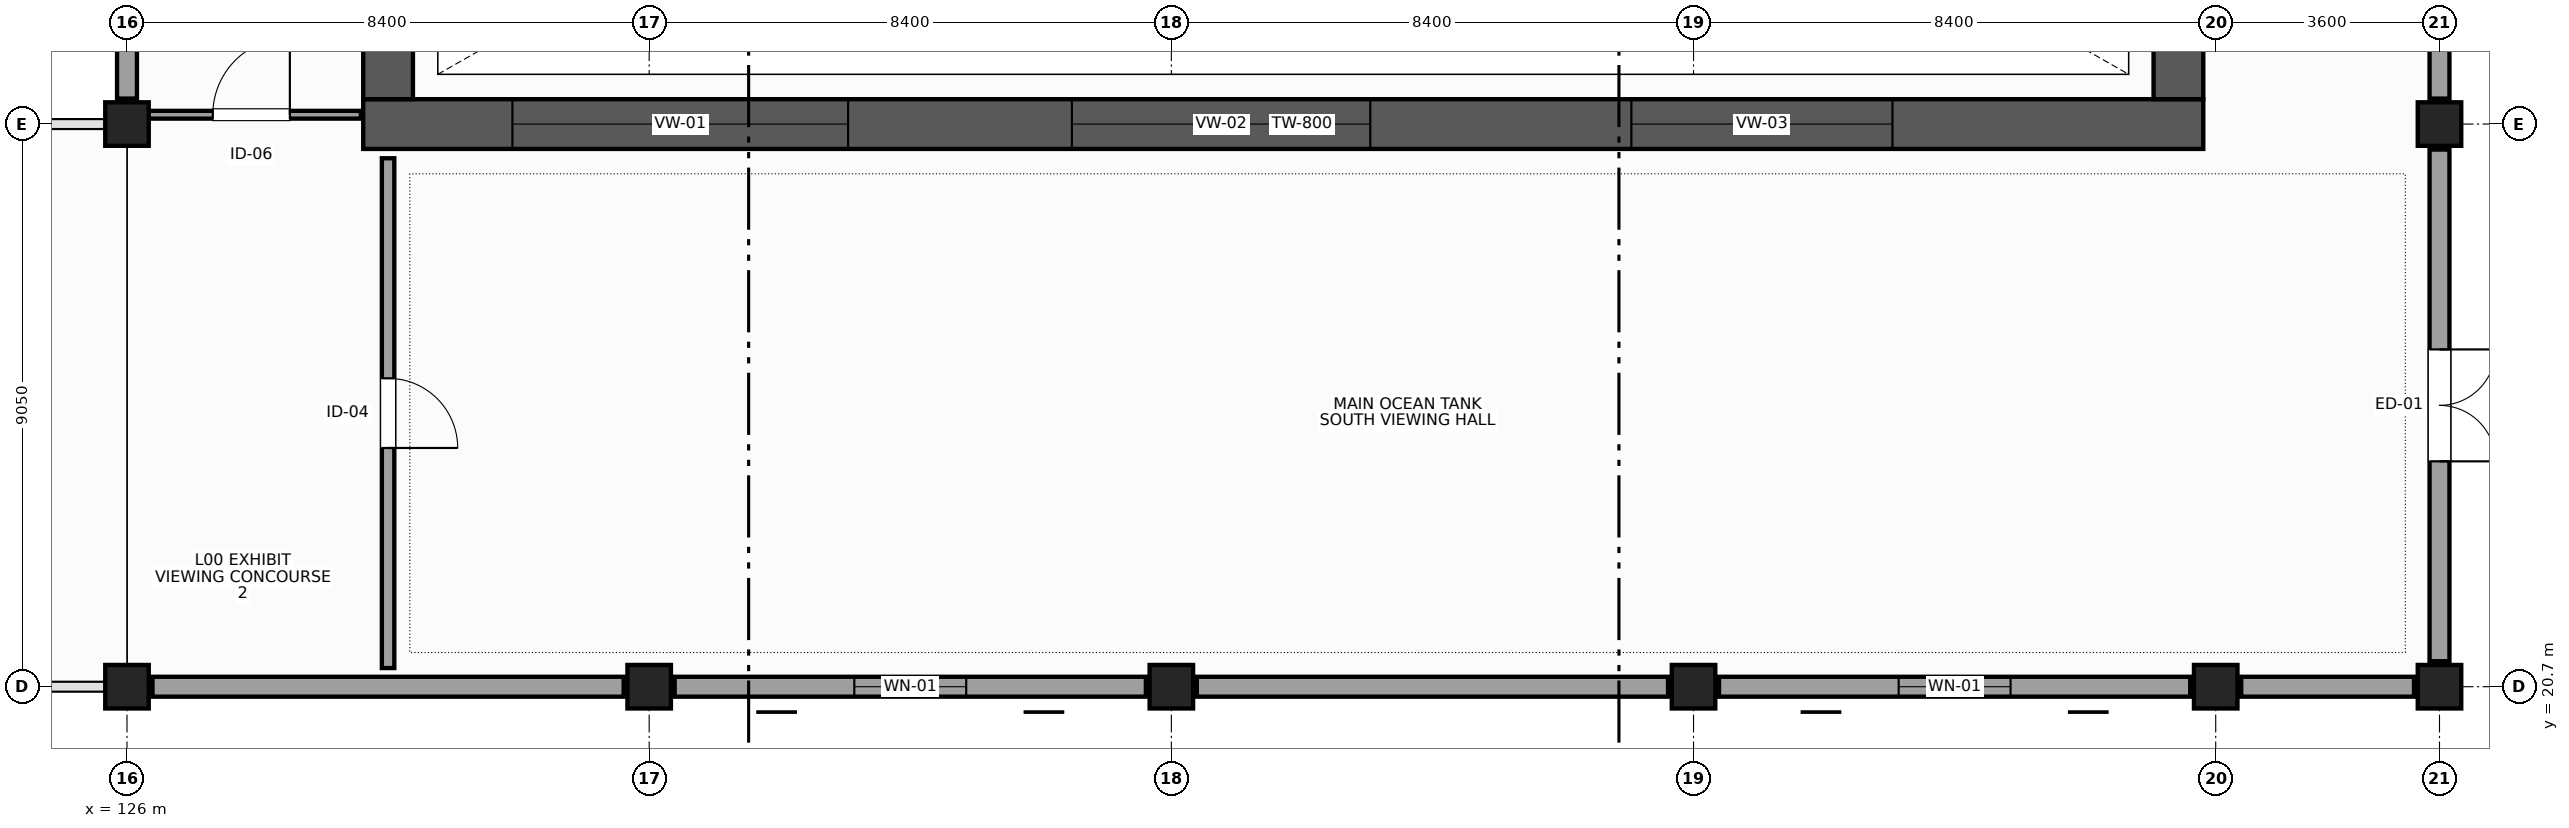
"""IFC4 building model, lengths in metres.
Left out: names, types, materials, properties, quantities, classifications, styles, units other than length and angle.
Written with IfcOpenShell. Run it as: python <this file> out.ifc"""

import sys

from ifc_helpers import new_model, si_unit, direction, frame, frame_2d, origin, origin_2d, place, context, subcontext, project, spatial, rectangle, extrude, element, fill, save


model = new_model("IFC4")
c1 = context("Model", 3, precision=1e-05, world=origin(), true_north=direction((0.0, 1.0)))
c2 = subcontext(c1, "Body", "Model", "MODEL_VIEW")
j1 = project(units=[si_unit("LENGTHUNIT", "METRE"), si_unit("PLANEANGLEUNIT", "RADIAN")], contexts=[c1])
p1 = place(None, origin())
s1 = spatial("IfcSite", under=j1, at=p1, CompositionType="ELEMENT")
p2 = place(p1, origin())
s2 = spatial("IfcBuilding", under=s1, at=p2, CompositionType="ELEMENT")
p3 = place(p2, origin())
s3 = spatial("IfcBuildingStorey", under=s2, at=p3, CompositionType="ELEMENT", Elevation=0.0)
for number, where, z_axis, x_axis in (
    (1, (126.0, 20.7, 0.0), (0.0, 0.0, 1.0), (1.0, 0.0, 0.0)),
    (2, (126.0, 29.75, 0.0), (0.0, 0.0, 1.0), (1.0, 0.0, 0.0)),
    (3, (134.4, 20.7, 0.0), (0.0, 0.0, 1.0), (1.0, 0.0, 0.0)),
    (4, (142.8, 20.7, 0.0), (0.0, 0.0, 1.0), (1.0, 0.0, 0.0)),
    (5, (151.2, 20.7, 0.0), (0.0, 0.0, 1.0), (1.0, 0.0, 0.0)),
    (6, (159.6, 20.7, 0.0), (0.0, 0.0, 1.0), (1.0, 0.0, 0.0)),
    (7, (163.2, 20.7, 0.0), (0.0, 0.0, 1.0), (1.0, 0.0, 0.0)),
    (8, (163.2, 29.75, 0.0), (0.0, 0.0, 1.0), (1.0, 0.0, 0.0)),
):
    element("IfcColumn", number, at=place(p3, frame(where, z_axis=z_axis, x_axis=x_axis)), inside=s3, PredefinedType="COLUMN", context=c2, shape_type="SweptSolid", body=[
        extrude(rectangle(XDim=0.7, YDim=0.7, at=origin_2d()), origin(), (0.0, 0.0, 1.0), 5.4),
    ])
p4 = place(p3, frame((129.8, 29.75, 0.0), z_axis=(0.0, 0.0, 1.0), x_axis=(1.0, 0.0, 0.0)))
e9 = element("IfcWall", 9, at=p4, inside=s3, PredefinedType="SOLIDWALL", context=c2, shape_type="SweptSolid", body=[
    extrude(rectangle(XDim=29.6, YDim=0.8, at=frame_2d((14.8, 0.0))), origin(), (0.0, 0.0, 1.0), 5.09),
])
p5 = place(p4, frame((2.4, 0.0, 0.7)))
e10 = element("IfcOpeningElement", 10, at=p5, cuts=e9, PredefinedType="OPENING", context=c2, shape_type="SweptSolid", body=[
    extrude(rectangle(XDim=5.4, YDim=3.6, at=frame_2d((2.7, 1.8))), frame((0.0, 0.41, 0.0), z_axis=(0.0, -1.0, 0.0), x_axis=(1.0, 0.0, 0.0)), (0.0, 0.0, 1.0), 0.82),
])
p6 = place(p4, frame((11.4, 0.0, 0.7)))
e11 = element("IfcOpeningElement", 11, at=p6, cuts=e9, PredefinedType="OPENING", context=c2, shape_type="SweptSolid", body=[
    extrude(rectangle(XDim=4.8, YDim=3.4, at=frame_2d((2.4, 1.7))), frame((0.0, 0.41, 0.0), z_axis=(0.0, -1.0, 0.0), x_axis=(1.0, 0.0, 0.0)), (0.0, 0.0, 1.0), 0.82),
])
p7 = place(p4, frame((20.4, 0.0, 0.7)))
e12 = element("IfcOpeningElement", 12, at=p7, cuts=e9, PredefinedType="OPENING", context=c2, shape_type="SweptSolid", body=[
    extrude(rectangle(XDim=4.2, YDim=3.2, at=frame_2d((2.1, 1.6))), frame((0.0, 0.41, 0.0), z_axis=(0.0, -1.0, 0.0), x_axis=(1.0, 0.0, 0.0)), (0.0, 0.0, 1.0), 0.82),
])
p8 = place(p3, frame((130.2, 30.15, 0.0), z_axis=(0.0, 0.0, 1.0), x_axis=(0.0, 1.0, 0.0)))
e13 = element("IfcWall", 13, at=p8, inside=s3, PredefinedType="SOLIDWALL", context=c2, shape_type="SweptSolid", body=[
    extrude(rectangle(XDim=15.9, YDim=0.8, at=frame_2d((7.95, 0.0))), origin(), (0.0, 0.0, 1.0), 5.09),
])
p9 = place(p8, frame((6.15, 0.0, 0.75)))
e14 = element("IfcOpeningElement", 14, at=p9, cuts=e13, PredefinedType="OPENING", context=c2, shape_type="SweptSolid", body=[
    extrude(rectangle(XDim=3.6, YDim=2.8, at=frame_2d((1.8, 1.4))), frame((0.0, 0.41, 0.0), z_axis=(0.0, -1.0, 0.0), x_axis=(1.0, 0.0, 0.0)), (0.0, 0.0, 1.0), 0.82),
])
p10 = place(p3, frame((159.0, 30.15, 0.0), z_axis=(0.0, 0.0, 1.0), x_axis=(0.0, 1.0, 0.0)))
e15 = element("IfcWall", 15, at=p10, inside=s3, PredefinedType="SOLIDWALL", context=c2, shape_type="SweptSolid", body=[
    extrude(rectangle(XDim=15.9, YDim=0.8, at=frame_2d((7.95, 0.0))), origin(), (0.0, 0.0, 1.0), 5.09),
])
p11 = place(p10, frame((6.15, 0.0, 0.75)))
e16 = element("IfcOpeningElement", 16, at=p11, cuts=e15, PredefinedType="OPENING", context=c2, shape_type="SweptSolid", body=[
    extrude(rectangle(XDim=3.6, YDim=2.8, at=frame_2d((1.8, 1.4))), frame((0.0, 0.41, 0.0), z_axis=(0.0, -1.0, 0.0), x_axis=(1.0, 0.0, 0.0)), (0.0, 0.0, 1.0), 0.82),
])
p12 = place(p3, frame((163.2, 21.11, 0.0), z_axis=(0.0, 0.0, 1.0), x_axis=(0.0, 1.0, 0.0)))
e17 = element("IfcWall", 17, at=p12, inside=s3, PredefinedType="STANDARD", context=c2, shape_type="SweptSolid", body=[
    extrude(rectangle(XDim=8.23, YDim=0.32, at=frame_2d((4.115, 0.0))), origin(), (0.0, 0.0, 1.0), 4.24),
])
p13 = place(p12, frame((3.215, 0.0, 0.0)))
e18 = element("IfcOpeningElement", 18, at=p13, cuts=e17, PredefinedType="OPENING", context=c2, shape_type="SweptSolid", body=[
    extrude(rectangle(XDim=1.8, YDim=2.4, at=frame_2d((0.9, 1.2))), frame((0.0, 0.17, 0.0), z_axis=(0.0, -1.0, 0.0), x_axis=(1.0, 0.0, 0.0)), (0.0, 0.0, 1.0), 0.34),
])
p14 = place(p3, frame((163.2, 30.16, 0.0), z_axis=(0.0, 0.0, 1.0), x_axis=(0.0, 1.0, 0.0)))
e19 = element("IfcWall", 19, at=p14, inside=s3, PredefinedType="STANDARD", context=c2, shape_type="SweptSolid", body=[
    extrude(rectangle(XDim=8.23, YDim=0.32, at=frame_2d((4.115, 0.0))), origin(), (0.0, 0.0, 1.0), 4.24),
])
p15 = place(p14, frame((3.215, 0.0, 1.05)))
e20 = element("IfcOpeningElement", 20, at=p15, cuts=e19, PredefinedType="OPENING", context=c2, shape_type="SweptSolid", body=[
    extrude(rectangle(XDim=1.8, YDim=2.4, at=frame_2d((0.9, 1.2))), frame((0.0, 0.17, 0.0), z_axis=(0.0, -1.0, 0.0), x_axis=(1.0, 0.0, 0.0)), (0.0, 0.0, 1.0), 0.34),
])
p16 = place(p3, frame((126.41, 20.7, 0.0), z_axis=(0.0, 0.0, 1.0), x_axis=(1.0, 0.0, 0.0)))
e21 = element("IfcWall", 21, at=p16, inside=s3, PredefinedType="STANDARD", context=c2, shape_type="SweptSolid", body=[
    extrude(rectangle(XDim=7.58, YDim=0.32, at=frame_2d((3.79, 0.0))), origin(), (0.0, 0.0, 1.0), 4.23),
])
p17 = place(p3, frame((134.81, 20.7, 0.0), z_axis=(0.0, 0.0, 1.0), x_axis=(1.0, 0.0, 0.0)))
e22 = element("IfcWall", 22, at=p17, inside=s3, PredefinedType="STANDARD", context=c2, shape_type="SweptSolid", body=[
    extrude(rectangle(XDim=7.58, YDim=0.32, at=frame_2d((3.79, 0.0))), origin(), (0.0, 0.0, 1.0), 4.23),
])
p18 = place(p17, frame((2.89, 0.0, 1.05)))
e23 = element("IfcOpeningElement", 23, at=p18, cuts=e22, PredefinedType="OPENING", context=c2, shape_type="SweptSolid", body=[
    extrude(rectangle(XDim=1.8, YDim=2.4, at=frame_2d((0.9, 1.2))), frame((0.0, 0.17, 0.0), z_axis=(0.0, -1.0, 0.0), x_axis=(1.0, 0.0, 0.0)), (0.0, 0.0, 1.0), 0.34),
])
p19 = place(p3, frame((143.21, 20.7, 0.0), z_axis=(0.0, 0.0, 1.0), x_axis=(1.0, 0.0, 0.0)))
e24 = element("IfcWall", 24, at=p19, inside=s3, PredefinedType="STANDARD", context=c2, shape_type="SweptSolid", body=[
    extrude(rectangle(XDim=7.58, YDim=0.32, at=frame_2d((3.79, 0.0))), origin(), (0.0, 0.0, 1.0), 4.23),
])
p20 = place(p3, frame((151.61, 20.7, 0.0), z_axis=(0.0, 0.0, 1.0), x_axis=(1.0, 0.0, 0.0)))
e25 = element("IfcWall", 25, at=p20, inside=s3, PredefinedType="STANDARD", context=c2, shape_type="SweptSolid", body=[
    extrude(rectangle(XDim=7.58, YDim=0.32, at=frame_2d((3.79, 0.0))), origin(), (0.0, 0.0, 1.0), 4.23),
])
p21 = place(p20, frame((2.89, 0.0, 1.05)))
e26 = element("IfcOpeningElement", 26, at=p21, cuts=e25, PredefinedType="OPENING", context=c2, shape_type="SweptSolid", body=[
    extrude(rectangle(XDim=1.8, YDim=2.4, at=frame_2d((0.9, 1.2))), frame((0.0, 0.17, 0.0), z_axis=(0.0, -1.0, 0.0), x_axis=(1.0, 0.0, 0.0)), (0.0, 0.0, 1.0), 0.34),
])
p22 = place(p3, frame((160.01, 20.7, 0.0), z_axis=(0.0, 0.0, 1.0), x_axis=(1.0, 0.0, 0.0)))
e27 = element("IfcWall", 27, at=p22, inside=s3, PredefinedType="STANDARD", context=c2, shape_type="SweptSolid", body=[
    extrude(rectangle(XDim=2.78, YDim=0.32, at=frame_2d((1.39, 0.0))), origin(), (0.0, 0.0, 1.0), 4.23),
])
p23 = place(p3, frame((126.0, 38.39, 0.0), z_axis=(0.0, 0.0, 1.0), x_axis=(0.0, -1.0, 0.0)))
e28 = element("IfcWall", 28, at=p23, inside=s3, PredefinedType="STANDARD", context=c2, shape_type="SweptSolid", body=[
    extrude(rectangle(XDim=8.23, YDim=0.32, at=frame_2d((4.115, 0.0))), origin(), (0.0, 0.0, 1.0), 4.24),
])
p24 = place(p3, frame((130.2, 21.0, 0.0), z_axis=(0.0, 0.0, 1.0), x_axis=(0.0, 1.0, 0.0)))
e29 = element("IfcWall", 29, at=p24, inside=s3, PredefinedType="PARTITIONING", context=c2, shape_type="SweptSolid", body=[
    extrude(rectangle(XDim=8.2, YDim=0.2, at=frame_2d((4.1, 0.0))), origin(), (0.0, 0.0, 1.0), 4.23),
])
p25 = place(p24, frame((3.54, 0.0, 0.0)))
e30 = element("IfcOpeningElement", 30, at=p25, cuts=e29, PredefinedType="OPENING", context=c2, shape_type="SweptSolid", body=[
    extrude(rectangle(XDim=1.12, YDim=2.2, at=frame_2d((0.56, 1.1))), frame((0.0, 0.11, 0.0), z_axis=(0.0, -1.0, 0.0), x_axis=(1.0, 0.0, 0.0)), (0.0, 0.0, 1.0), 0.22),
])
p26 = place(p3, frame((126.237, 29.9, 0.0), z_axis=(0.0, 0.0, 1.0), x_axis=(1.0, 0.0, 0.0)))
e31 = element("IfcWall", 31, at=p26, inside=s3, PredefinedType="PARTITIONING", context=c2, shape_type="SweptSolid", body=[
    extrude(rectangle(XDim=3.525, YDim=0.125, at=frame_2d((1.762, 0.0))), origin(), (0.0, 0.0, 1.0), 4.14),
])
p27 = place(p26, frame((1.143, 0.0, 0.0)))
e32 = element("IfcOpeningElement", 32, at=p27, cuts=e31, PredefinedType="OPENING", context=c2, shape_type="SweptSolid", body=[
    extrude(rectangle(XDim=1.24, YDim=2.25, at=frame_2d((0.62, 1.125))), frame((0.0, 0.073, 0.0), z_axis=(0.0, -1.0, 0.0), x_axis=(1.0, 0.0, 0.0)), (0.0, 0.0, 1.0), 0.145),
])
p28 = place(p13, frame((1.8, 0.0, 0.0), z_axis=(0.0, 0.0, 1.0), x_axis=(-1.0, 0.0, 0.0)))
e33 = element("IfcDoor", 33, at=p28, inside=s3, OperationType="DOUBLE_DOOR_SINGLE_SWING", PredefinedType="DOOR", context=c2, shape_type="SweptSolid", body=[
    extrude(rectangle(XDim=1.8, YDim=2.4, at=frame_2d((0.9, 1.2))), frame((0.0, 0.025, 0.0), z_axis=(0.0, -1.0, 0.0), x_axis=(1.0, 0.0, 0.0)), (0.0, 0.0, 1.0), 0.05),
])
fill(e18, e33)
p29 = place(p18, origin())
e34 = element("IfcWindow", 34, at=p29, inside=s3, PartitioningType="SINGLE_PANEL", PredefinedType="WINDOW", context=c2, shape_type="SweptSolid", body=[
    extrude(rectangle(XDim=1.8, YDim=2.4, at=frame_2d((0.9, 1.2))), frame((0.0, 0.03, 0.0), z_axis=(0.0, -1.0, 0.0), x_axis=(1.0, 0.0, 0.0)), (0.0, 0.0, 1.0), 0.06),
])
fill(e23, e34)
p30 = place(p21, origin())
e35 = element("IfcWindow", 35, at=p30, inside=s3, PartitioningType="SINGLE_PANEL", PredefinedType="WINDOW", context=c2, shape_type="SweptSolid", body=[
    extrude(rectangle(XDim=1.8, YDim=2.4, at=frame_2d((0.9, 1.2))), frame((0.0, 0.03, 0.0), z_axis=(0.0, -1.0, 0.0), x_axis=(1.0, 0.0, 0.0)), (0.0, 0.0, 1.0), 0.06),
])
fill(e26, e35)
p31 = place(p5, origin())
e36 = element("IfcWindow", 36, at=p31, inside=s3, PartitioningType="SINGLE_PANEL", PredefinedType="WINDOW", context=c2, shape_type="SweptSolid", body=[
    extrude(rectangle(XDim=5.4, YDim=3.6, at=frame_2d((2.7, 1.8))), frame((0.0, 0.12, 0.0), z_axis=(0.0, -1.0, 0.0), x_axis=(1.0, 0.0, 0.0)), (0.0, 0.0, 1.0), 0.24),
])
fill(e10, e36)
p32 = place(p6, origin())
e37 = element("IfcWindow", 37, at=p32, inside=s3, PartitioningType="SINGLE_PANEL", PredefinedType="WINDOW", context=c2, shape_type="SweptSolid", body=[
    extrude(rectangle(XDim=4.8, YDim=3.4, at=frame_2d((2.4, 1.7))), frame((0.0, 0.11, 0.0), z_axis=(0.0, -1.0, 0.0), x_axis=(1.0, 0.0, 0.0)), (0.0, 0.0, 1.0), 0.22),
])
fill(e11, e37)
p33 = place(p7, origin())
e38 = element("IfcWindow", 38, at=p33, inside=s3, PartitioningType="SINGLE_PANEL", PredefinedType="WINDOW", context=c2, shape_type="SweptSolid", body=[
    extrude(rectangle(XDim=4.2, YDim=3.2, at=frame_2d((2.1, 1.6))), frame((0.0, 0.1, 0.0), z_axis=(0.0, -1.0, 0.0), x_axis=(1.0, 0.0, 0.0)), (0.0, 0.0, 1.0), 0.2),
])
fill(e12, e38)
p34 = place(p25, frame((1.12, 0.0, 0.0), z_axis=(0.0, 0.0, 1.0), x_axis=(-1.0, 0.0, 0.0)))
e39 = element("IfcDoor", 39, at=p34, inside=s3, OperationType="SINGLE_SWING_RIGHT", PredefinedType="DOOR", context=c2, shape_type="SweptSolid", body=[
    extrude(rectangle(XDim=1.12, YDim=2.2, at=frame_2d((0.56, 1.1))), frame((0.0, 0.025, 0.0), z_axis=(0.0, -1.0, 0.0), x_axis=(1.0, 0.0, 0.0)), (0.0, 0.0, 1.0), 0.05),
])
fill(e30, e39)
p35 = place(p27, origin())
e40 = element("IfcDoor", 40, at=p35, inside=s3, OperationType="SINGLE_SWING_RIGHT", PredefinedType="DOOR", context=c2, shape_type="SweptSolid", body=[
    extrude(rectangle(XDim=1.24, YDim=2.25, at=frame_2d((0.62, 1.125))), frame((0.0, 0.025, 0.0), z_axis=(0.0, -1.0, 0.0), x_axis=(1.0, 0.0, 0.0)), (0.0, 0.0, 1.0), 0.05),
])
fill(e32, e40)
save(model, sys.argv[1])
